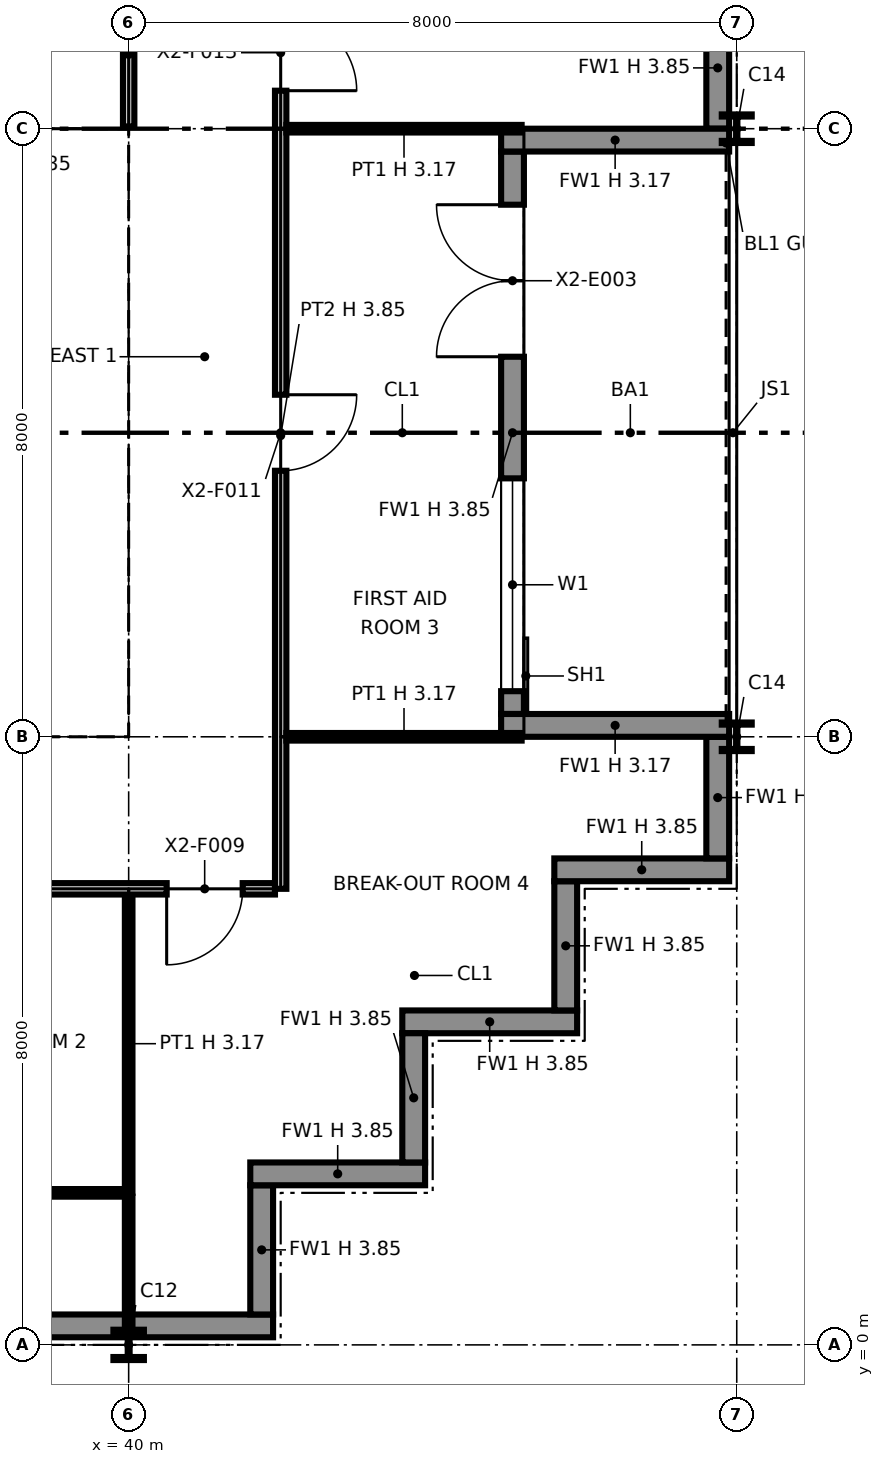
"""IFC4 building model, lengths in metres.
Left out: names, types, materials, properties, quantities, classifications, styles, units other than length and angle.
Written with IfcOpenShell. Run it as: python <this file> out.ifc"""

import sys

from ifc_helpers import new_model, si_unit, direction, frame, frame_2d, origin, origin_2d, place, context, subcontext, project, spatial, polyline, rectangle, i_section, outline, extrude, element, fill, save


model = new_model("IFC4")
c1 = context("Model", 3, precision=1e-05, world=origin(), true_north=direction((0.0, 1.0)))
c2 = subcontext(c1, "Body", "Model", "MODEL_VIEW")
j1 = project(units=[si_unit("LENGTHUNIT", "METRE"), si_unit("PLANEANGLEUNIT", "RADIAN")], contexts=[c1])
p1 = place(None, origin())
s1 = spatial("IfcSite", under=j1, at=p1, CompositionType="ELEMENT")
p2 = place(p1, origin())
s2 = spatial("IfcBuilding", under=s1, at=p2, CompositionType="ELEMENT")
p3 = place(p2, frame((0.0, 0.0, 263.0)))
s3 = spatial("IfcBuildingStorey", under=s2, at=p3, CompositionType="ELEMENT", Elevation=263.0)
p4 = place(p3, frame((40.0, 0.0, 0.0), z_axis=(0.0, 0.0, 1.0), x_axis=(1.0, 0.0, 0.0)))
e1 = element("IfcColumn", 1, at=p4, inside=s3, PredefinedType="COLUMN", context=c2, shape_type="SweptSolid", body=[
    extrude(i_section(OverallWidth=0.401, OverallDepth=0.399, WebThickness=0.025, FlangeThickness=0.04, at=origin_2d()), origin(), (0.0, 0.0, 1.0), 3.85),
])
for number, where, z_axis, x_axis in (
    (2, (40.0, 8.0, 0.0), (0.0, 0.0, 1.0), (1.0, 0.0, 0.0)),
    (3, (40.0, 16.0, 0.0), (0.0, 0.0, 1.0), (1.0, 0.0, 0.0)),
):
    element("IfcColumn", number, at=place(p3, frame(where, z_axis=z_axis, x_axis=x_axis)), inside=s3, PredefinedType="COLUMN", context=c2, shape_type="SweptSolid", body=[
        extrude(i_section(OverallWidth=0.371, OverallDepth=0.361, WebThickness=0.012, FlangeThickness=0.02, at=origin_2d()), origin(), (0.0, 0.0, 1.0), 3.85),
    ])
for number, where, z_axis, x_axis in (
    (4, (48.0, 8.0, 0.0), (0.0, 0.0, 1.0), (1.0, 0.0, 0.0)),
    (5, (48.0, 16.0, 0.0), (0.0, 0.0, 1.0), (1.0, 0.0, 0.0)),
):
    element("IfcColumn", number, at=place(p3, frame(where, z_axis=z_axis, x_axis=x_axis)), inside=s3, PredefinedType="COLUMN", context=c2, shape_type="SweptSolid", body=[
        extrude(i_section(OverallWidth=0.394, OverallDepth=0.376, WebThickness=0.017, FlangeThickness=0.028, at=origin_2d()), origin(), (0.0, 0.0, 1.0), 3.85),
    ])
p5 = place(p3, frame((32.0, 0.25, 0.0), z_axis=(0.0, 0.0, 1.0), x_axis=(1.0, 0.0, 0.0)))
e6 = element("IfcWall", 6, at=p5, inside=s3, PredefinedType="SOLIDWALL", context=c2, shape_type="SweptSolid", body=[
    extrude(rectangle(XDim=9.9, YDim=0.3, at=frame_2d((4.95, 0.0))), origin(), (0.0, 0.0, 1.0), 3.85),
])
p6 = place(p3, frame((41.75, 0.4, 0.0), z_axis=(0.0, 0.0, 1.0), x_axis=(0.0, 1.0, 0.0)))
e7 = element("IfcWall", 7, at=p6, inside=s3, PredefinedType="SOLIDWALL", context=c2, shape_type="SweptSolid", body=[
    extrude(rectangle(XDim=1.7, YDim=0.3, at=frame_2d((0.85, 0.0))), origin(), (0.0, 0.0, 1.0), 3.85),
])
p7 = place(p3, frame((41.6, 2.25, 0.0), z_axis=(0.0, 0.0, 1.0), x_axis=(1.0, 0.0, 0.0)))
e8 = element("IfcWall", 8, at=p7, inside=s3, PredefinedType="SOLIDWALL", context=c2, shape_type="SweptSolid", body=[
    extrude(rectangle(XDim=2.3, YDim=0.3, at=frame_2d((1.15, 0.0))), origin(), (0.0, 0.0, 1.0), 3.85),
])
p8 = place(p3, frame((43.75, 2.4, 0.0), z_axis=(0.0, 0.0, 1.0), x_axis=(0.0, 1.0, 0.0)))
e9 = element("IfcWall", 9, at=p8, inside=s3, PredefinedType="SOLIDWALL", context=c2, shape_type="SweptSolid", body=[
    extrude(rectangle(XDim=1.7, YDim=0.3, at=frame_2d((0.85, 0.0))), origin(), (0.0, 0.0, 1.0), 3.85),
])
p9 = place(p3, frame((43.6, 4.25, 0.0), z_axis=(0.0, 0.0, 1.0), x_axis=(1.0, 0.0, 0.0)))
e10 = element("IfcWall", 10, at=p9, inside=s3, PredefinedType="SOLIDWALL", context=c2, shape_type="SweptSolid", body=[
    extrude(rectangle(XDim=2.3, YDim=0.3, at=frame_2d((1.15, 0.0))), origin(), (0.0, 0.0, 1.0), 3.85),
])
p10 = place(p3, frame((45.75, 4.4, 0.0), z_axis=(0.0, 0.0, 1.0), x_axis=(0.0, 1.0, 0.0)))
e11 = element("IfcWall", 11, at=p10, inside=s3, PredefinedType="SOLIDWALL", context=c2, shape_type="SweptSolid", body=[
    extrude(rectangle(XDim=1.7, YDim=0.3, at=frame_2d((0.85, 0.0))), origin(), (0.0, 0.0, 1.0), 3.85),
])
p11 = place(p3, frame((45.6, 6.25, 0.0), z_axis=(0.0, 0.0, 1.0), x_axis=(1.0, 0.0, 0.0)))
e12 = element("IfcWall", 12, at=p11, inside=s3, PredefinedType="SOLIDWALL", context=c2, shape_type="SweptSolid", body=[
    extrude(rectangle(XDim=2.3, YDim=0.3, at=frame_2d((1.15, 0.0))), origin(), (0.0, 0.0, 1.0), 3.85),
])
p12 = place(p3, frame((47.75, 6.4, 0.0), z_axis=(0.0, 0.0, 1.0), x_axis=(0.0, 1.0, 0.0)))
e13 = element("IfcWall", 13, at=p12, inside=s3, PredefinedType="SOLIDWALL", context=c2, shape_type="SweptSolid", body=[
    extrude(rectangle(XDim=1.6, YDim=0.3, at=frame_2d((0.8, 0.0))), origin(), (0.0, 0.0, 1.0), 3.85),
])
p13 = place(p3, frame((45.05, 8.3, 0.0), z_axis=(0.0, 0.0, 1.0), x_axis=(0.0, 1.0, 0.0)))
e14 = element("IfcWall", 14, at=p13, inside=s3, PredefinedType="SOLIDWALL", context=c2, shape_type="SweptSolid", body=[
    extrude(rectangle(XDim=7.4, YDim=0.3, at=frame_2d((3.7, 0.0))), origin(), (0.0, 0.0, 1.0), 3.85),
])
p14 = place(p13, frame((0.3, 0.0, 0.9)))
e15 = element("IfcOpeningElement", 15, at=p14, cuts=e14, PredefinedType="OPENING", context=c2, shape_type="SweptSolid", body=[
    extrude(rectangle(XDim=2.8, YDim=2.2, at=frame_2d((1.4, 1.1))), frame((0.0, 0.16, 0.0), z_axis=(0.0, -1.0, 0.0), x_axis=(1.0, 0.0, 0.0)), (0.0, 0.0, 1.0), 0.32),
])
p15 = place(p13, frame((4.7, 0.0, 0.0)))
e16 = element("IfcOpeningElement", 16, at=p15, cuts=e14, PredefinedType="OPENING", context=c2, shape_type="SweptSolid", body=[
    extrude(rectangle(XDim=2.0, YDim=2.4, at=frame_2d((1.0, 1.2))), frame((0.0, 0.16, 0.0), z_axis=(0.0, -1.0, 0.0), x_axis=(1.0, 0.0, 0.0)), (0.0, 0.0, 1.0), 0.32),
])
for number, where, z_axis, x_axis in (
    (17, (47.9, 8.15, 0.0), (0.0, 0.0, 1.0), (-1.0, 0.0, 0.0)),
    (18, (47.9, 15.85, 0.0), (0.0, 0.0, 1.0), (-1.0, 0.0, 0.0)),
):
    element("IfcWall", number, at=place(p3, frame(where, z_axis=z_axis, x_axis=x_axis)), inside=s3, PredefinedType="SOLIDWALL", context=c2, shape_type="SweptSolid", body=[
        extrude(rectangle(XDim=3.0, YDim=0.3, at=frame_2d((1.5, 0.0))), origin(), (0.0, 0.0, 1.0), 3.171),
    ])
p16 = place(p3, frame((47.75, 16.0, 0.0), z_axis=(0.0, 0.0, 1.0), x_axis=(0.0, 1.0, 0.0)))
e19 = element("IfcWall", 19, at=p16, inside=s3, PredefinedType="SOLIDWALL", context=c2, shape_type="SweptSolid", body=[
    extrude(rectangle(XDim=1.6, YDim=0.3, at=frame_2d((0.8, 0.0))), origin(), (0.0, 0.0, 1.0), 3.85),
])
p17 = place(p3, frame((24.65, 8.75, 0.0), z_axis=(0.0, 0.0, 1.0), x_axis=(1.0, 0.0, 0.0)))
e20 = element("IfcWall", 20, at=p17, inside=s3, PredefinedType="PARTITIONING", context=c2, shape_type="SweptSolid", body=[
    extrude(outline(polyline([(0.0, 0.0), (14.7, 0.0), (14.7, 3.85), (7.438, 3.85), (7.438, 3.308), (7.262, 3.308), (7.261, 3.85), (0.0, 3.85), (0.0, 0.0)])), frame((0.0, 0.1, 0.0), z_axis=(0.0, -1.0, 0.0), x_axis=(1.0, 0.0, 0.0)), (0.0, 0.0, 1.0), 0.2),
])
p18 = place(p3, frame((24.65, 15.25, 0.0), z_axis=(0.0, 0.0, 1.0), x_axis=(1.0, 0.0, 0.0)))
e21 = element("IfcWall", 21, at=p18, inside=s3, PredefinedType="PARTITIONING", context=c2, shape_type="SweptSolid", body=[
    extrude(outline(polyline([(0.0, 0.0), (14.7, 0.0), (14.7, 3.85), (7.438, 3.85), (7.438, 3.308), (7.262, 3.308), (7.261, 3.85), (0.0, 3.85), (0.0, 0.0)])), frame((0.0, 0.1, 0.0), z_axis=(0.0, -1.0, 0.0), x_axis=(1.0, 0.0, 0.0)), (0.0, 0.0, 1.0), 0.2),
])
p19 = place(p18, frame((2.85, 0.0, 0.0)))
e22 = element("IfcOpeningElement", 22, at=p19, cuts=e21, PredefinedType="OPENING", context=c2, shape_type="SweptSolid", body=[
    extrude(rectangle(XDim=1.8, YDim=2.1, at=frame_2d((0.9, 1.05))), frame((0.0, 0.11, 0.0), z_axis=(0.0, -1.0, 0.0), x_axis=(1.0, 0.0, 0.0)), (0.0, 0.0, 1.0), 0.22),
])
p20 = place(p18, frame((9.95, 0.0, 0.0), z_axis=(0.0, 0.0, 1.0), x_axis=(-1.0, 0.0, 0.0)))
e23 = element("IfcOpeningElement", 23, at=p20, cuts=e21, PredefinedType="OPENING", context=c2, shape_type="SweptSolid", body=[
    extrude(rectangle(XDim=1.4, YDim=2.1, at=frame_2d((0.7, 1.05))), frame((0.0, 0.11, 0.0), z_axis=(0.0, -1.0, 0.0), x_axis=(1.0, 0.0, 0.0)), (0.0, 0.0, 1.0), 0.22),
])
p21 = place(p18, frame((13.4, 0.0, 0.0), z_axis=(0.0, 0.0, 1.0), x_axis=(-1.0, 0.0, 0.0)))
e24 = element("IfcOpeningElement", 24, at=p21, cuts=e21, PredefinedType="OPENING", context=c2, shape_type="SweptSolid", body=[
    extrude(rectangle(XDim=1.4, YDim=2.1, at=frame_2d((0.7, 1.05))), frame((0.0, 0.11, 0.0), z_axis=(0.0, -1.0, 0.0), x_axis=(1.0, 0.0, 0.0)), (0.0, 0.0, 1.0), 0.22),
])
p22 = place(p3, frame((39.25, 8.85, 0.0), z_axis=(0.0, 0.0, 1.0), x_axis=(0.0, 1.0, 0.0)))
e25 = element("IfcWall", 25, at=p22, inside=s3, PredefinedType="PARTITIONING", context=c2, shape_type="SweptSolid", body=[
    extrude(rectangle(XDim=6.3, YDim=0.2, at=frame_2d((3.15, 0.0))), origin(), (0.0, 0.0, 1.0), 3.85),
])
p23 = place(p3, frame((40.0, 0.13, 0.0), z_axis=(0.0, 0.0, 1.0), x_axis=(0.0, 1.0, 0.0)))
e26 = element("IfcWall", 26, at=p23, inside=s3, PredefinedType="PARTITIONING", context=c2, shape_type="SweptSolid", body=[
    extrude(rectangle(XDim=1.82, YDim=0.1, at=frame_2d((0.91, 0.0))), origin(), (0.0, 0.0, 1.0), 3.172),
])
p24 = place(p3, frame((32.03, 2.0, 0.0), z_axis=(0.0, 0.0, 1.0), x_axis=(1.0, 0.0, 0.0)))
e27 = element("IfcWall", 27, at=p24, inside=s3, PredefinedType="PARTITIONING", context=c2, shape_type="SweptSolid", body=[
    extrude(rectangle(XDim=7.92, YDim=0.1, at=frame_2d((3.96, 0.0))), origin(), (0.0, 0.0, 1.0), 3.85),
])
p25 = place(p24, frame((3.47, 0.0, 0.0)))
e28 = element("IfcOpeningElement", 28, at=p25, cuts=e27, PredefinedType="OPENING", context=c2, shape_type="SweptSolid", body=[
    extrude(rectangle(XDim=1.0, YDim=2.1, at=frame_2d((0.5, 1.05))), frame((0.0, 0.06, 0.0), z_axis=(0.0, -1.0, 0.0), x_axis=(1.0, 0.0, 0.0)), (0.0, 0.0, 1.0), 0.12),
])
p26 = place(p3, frame((40.0, 2.0, 0.0), z_axis=(0.0, 0.0, 1.0), x_axis=(0.0, 1.0, 0.0)))
e29 = element("IfcWall", 29, at=p26, inside=s3, PredefinedType="PARTITIONING", context=c2, shape_type="SweptSolid", body=[
    extrude(rectangle(XDim=3.925, YDim=0.1, at=frame_2d((1.962, 0.0))), origin(), (0.0, 0.0, 1.0), 3.172),
])
p27 = place(p3, frame((6.075, 6.0, 0.0), z_axis=(0.0, 0.0, 1.0), x_axis=(1.0, 0.0, 0.0)))
e30 = element("IfcWall", 30, at=p27, inside=s3, PredefinedType="PARTITIONING", context=c2, shape_type="SweptSolid", body=[
    extrude(rectangle(XDim=35.85, YDim=0.15, at=frame_2d((17.925, 0.0))), origin(), (0.0, 0.0, 1.0), 3.85),
])
p28 = place(p27, frame((14.425, 0.0, 0.0), z_axis=(0.0, 0.0, 1.0), x_axis=(-1.0, 0.0, 0.0)))
e31 = element("IfcOpeningElement", 31, at=p28, cuts=e30, PredefinedType="OPENING", context=c2, shape_type="SweptSolid", body=[
    extrude(rectangle(XDim=1.0, YDim=2.1, at=frame_2d((0.5, 1.05))), frame((0.0, 0.085, 0.0), z_axis=(0.0, -1.0, 0.0), x_axis=(1.0, 0.0, 0.0)), (0.0, 0.0, 1.0), 0.17),
])
p29 = place(p27, frame((30.425, 0.0, 0.0), z_axis=(0.0, 0.0, 1.0), x_axis=(-1.0, 0.0, 0.0)))
e32 = element("IfcOpeningElement", 32, at=p29, cuts=e30, PredefinedType="OPENING", context=c2, shape_type="SweptSolid", body=[
    extrude(rectangle(XDim=1.0, YDim=2.1, at=frame_2d((0.5, 1.05))), frame((0.0, 0.085, 0.0), z_axis=(0.0, -1.0, 0.0), x_axis=(1.0, 0.0, 0.0)), (0.0, 0.0, 1.0), 0.17),
])
p30 = place(p27, frame((4.425, 0.0, 0.0), z_axis=(0.0, 0.0, 1.0), x_axis=(-1.0, 0.0, 0.0)))
e33 = element("IfcOpeningElement", 33, at=p30, cuts=e30, PredefinedType="OPENING", context=c2, shape_type="SweptSolid", body=[
    extrude(rectangle(XDim=1.0, YDim=2.1, at=frame_2d((0.5, 1.05))), frame((0.0, 0.085, 0.0), z_axis=(0.0, -1.0, 0.0), x_axis=(1.0, 0.0, 0.0)), (0.0, 0.0, 1.0), 0.17),
])
p31 = place(p27, frame((8.425, 0.0, 0.0), z_axis=(0.0, 0.0, 1.0), x_axis=(-1.0, 0.0, 0.0)))
e34 = element("IfcOpeningElement", 34, at=p31, cuts=e30, PredefinedType="OPENING", context=c2, shape_type="SweptSolid", body=[
    extrude(rectangle(XDim=1.0, YDim=2.1, at=frame_2d((0.5, 1.05))), frame((0.0, 0.085, 0.0), z_axis=(0.0, -1.0, 0.0), x_axis=(1.0, 0.0, 0.0)), (0.0, 0.0, 1.0), 0.17),
])
p32 = place(p27, frame((23.425, 0.0, 0.0), z_axis=(0.0, 0.0, 1.0), x_axis=(-1.0, 0.0, 0.0)))
e35 = element("IfcOpeningElement", 35, at=p32, cuts=e30, PredefinedType="OPENING", context=c2, shape_type="SweptSolid", body=[
    extrude(rectangle(XDim=1.0, YDim=2.1, at=frame_2d((0.5, 1.05))), frame((0.0, 0.085, 0.0), z_axis=(0.0, -1.0, 0.0), x_axis=(1.0, 0.0, 0.0)), (0.0, 0.0, 1.0), 0.17),
])
p33 = place(p27, frame((35.425, 0.0, 0.0), z_axis=(0.0, 0.0, 1.0), x_axis=(-1.0, 0.0, 0.0)))
e36 = element("IfcOpeningElement", 36, at=p33, cuts=e30, PredefinedType="OPENING", context=c2, shape_type="SweptSolid", body=[
    extrude(rectangle(XDim=1.0, YDim=2.1, at=frame_2d((0.5, 1.05))), frame((0.0, 0.085, 0.0), z_axis=(0.0, -1.0, 0.0), x_axis=(1.0, 0.0, 0.0)), (0.0, 0.0, 1.0), 0.17),
])
p34 = place(p3, frame((42.0, 6.0, 0.0), z_axis=(0.0, 0.0, 1.0), x_axis=(0.0, 1.0, 0.0)))
e37 = element("IfcWall", 37, at=p34, inside=s3, PredefinedType="PARTITIONING", context=c2, shape_type="SweptSolid", body=[
    extrude(outline(polyline([(0.0, 0.0), (11.925, 0.0), (11.925, 3.85), (10.3, 3.85), (10.298, 3.172), (9.702, 3.172), (9.7, 3.85), (6.3, 3.85), (6.298, 3.172), (5.702, 3.172), (5.7, 3.85), (2.3, 3.85), (2.298, 3.172), (1.702, 3.172), (1.7, 3.85), (0.0, 3.85), (0.0, 0.0)])), frame((0.0, 0.075, 0.0), z_axis=(0.0, -1.0, 0.0), x_axis=(1.0, 0.0, 0.0)), (0.0, 0.0, 1.0), 0.15),
])
p35 = place(p34, frame((6.5, 0.0, 0.0), z_axis=(0.0, 0.0, 1.0), x_axis=(-1.0, 0.0, 0.0)))
e38 = element("IfcOpeningElement", 38, at=p35, cuts=e37, PredefinedType="OPENING", context=c2, shape_type="SweptSolid", body=[
    extrude(rectangle(XDim=1.0, YDim=2.1, at=frame_2d((0.5, 1.05))), frame((0.0, 0.085, 0.0), z_axis=(0.0, -1.0, 0.0), x_axis=(1.0, 0.0, 0.0)), (0.0, 0.0, 1.0), 0.17),
])
p36 = place(p34, frame((11.5, 0.0, 0.0), z_axis=(0.0, 0.0, 1.0), x_axis=(-1.0, 0.0, 0.0)))
e39 = element("IfcOpeningElement", 39, at=p36, cuts=e37, PredefinedType="OPENING", context=c2, shape_type="SweptSolid", body=[
    extrude(rectangle(XDim=1.0, YDim=2.1, at=frame_2d((0.5, 1.05))), frame((0.0, 0.085, 0.0), z_axis=(0.0, -1.0, 0.0), x_axis=(1.0, 0.0, 0.0)), (0.0, 0.0, 1.0), 0.17),
])
for number, where, z_axis, x_axis in (
    (40, (42.075, 8.0, 0.0), (0.0, 0.0, 1.0), (1.0, 0.0, 0.0)),
    (41, (42.075, 16.0, 0.0), (0.0, 0.0, 1.0), (1.0, 0.0, 0.0)),
):
    element("IfcWall", number, at=place(p3, frame(where, z_axis=z_axis, x_axis=x_axis)), inside=s3, PredefinedType="PARTITIONING", context=c2, shape_type="SweptSolid", body=[
        extrude(rectangle(XDim=3.095, YDim=0.1, at=frame_2d((1.547, 0.0))), origin(), (0.0, 0.0, 1.0), 3.172),
    ])
p37 = place(p3, frame((40.0, 16.03, 0.0), z_axis=(0.0, 0.0, 1.0), x_axis=(0.0, 1.0, 0.0)))
e42 = element("IfcWall", 42, at=p37, inside=s3, PredefinedType="PARTITIONING", context=c2, shape_type="SweptSolid", body=[
    extrude(rectangle(XDim=1.895, YDim=0.15, at=frame_2d((0.948, 0.0))), origin(), (0.0, 0.0, 1.0), 3.172),
])
p38 = place(p14, origin())
e43 = element("IfcWindow", 43, at=p38, inside=s3, PartitioningType="SINGLE_PANEL", PredefinedType="WINDOW", context=c2, shape_type="SweptSolid", body=[
    extrude(rectangle(XDim=2.8, YDim=2.2, at=frame_2d((1.4, 1.1))), frame((0.0, 0.03, 0.0), z_axis=(0.0, -1.0, 0.0), x_axis=(1.0, 0.0, 0.0)), (0.0, 0.0, 1.0), 0.06),
])
fill(e15, e43)
p39 = place(p15, origin())
e44 = element("IfcDoor", 44, at=p39, inside=s3, OperationType="DOUBLE_DOOR_SINGLE_SWING", PredefinedType="DOOR", context=c2, shape_type="SweptSolid", body=[
    extrude(rectangle(XDim=2.0, YDim=2.4, at=frame_2d((1.0, 1.2))), frame((0.0, 0.025, 0.0), z_axis=(0.0, -1.0, 0.0), x_axis=(1.0, 0.0, 0.0)), (0.0, 0.0, 1.0), 0.05),
])
fill(e16, e44)
p40 = place(p33, origin())
e45 = element("IfcDoor", 45, at=p40, inside=s3, OperationType="SINGLE_SWING_RIGHT", PredefinedType="DOOR", context=c2, shape_type="SweptSolid", body=[
    extrude(rectangle(XDim=1.0, YDim=2.1, at=frame_2d((0.5, 1.05))), frame((0.0, 0.025, 0.0), z_axis=(0.0, -1.0, 0.0), x_axis=(1.0, 0.0, 0.0)), (0.0, 0.0, 1.0), 0.05),
])
fill(e36, e45)
p41 = place(p35, origin())
e46 = element("IfcDoor", 46, at=p41, inside=s3, OperationType="SINGLE_SWING_LEFT", PredefinedType="DOOR", context=c2, shape_type="SweptSolid", body=[
    extrude(rectangle(XDim=1.0, YDim=2.1, at=frame_2d((0.5, 1.05))), frame((0.0, 0.025, 0.0), z_axis=(0.0, -1.0, 0.0), x_axis=(1.0, 0.0, 0.0)), (0.0, 0.0, 1.0), 0.05),
])
fill(e38, e46)
p42 = place(p36, origin())
e47 = element("IfcDoor", 47, at=p42, inside=s3, OperationType="SINGLE_SWING_RIGHT", PredefinedType="DOOR", context=c2, shape_type="SweptSolid", body=[
    extrude(rectangle(XDim=1.0, YDim=2.1, at=frame_2d((0.5, 1.05))), frame((0.0, 0.025, 0.0), z_axis=(0.0, -1.0, 0.0), x_axis=(1.0, 0.0, 0.0)), (0.0, 0.0, 1.0), 0.05),
])
fill(e39, e47)
save(model, sys.argv[1])
